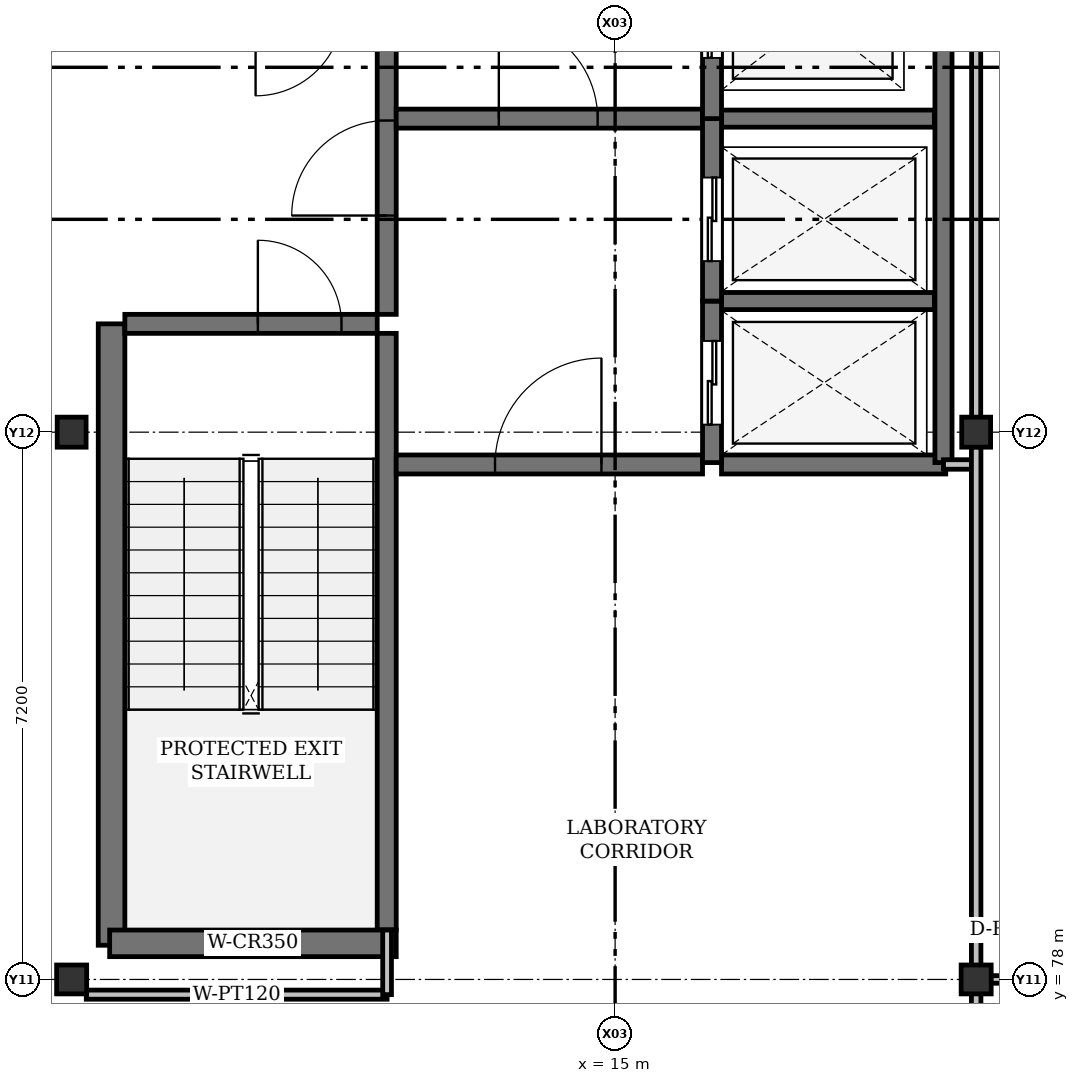
"""IFC4 building model, lengths in metres.
Left out: names, types, materials, properties, quantities, classifications, styles, units other than length and angle.
Written with IfcOpenShell. Run it as: python <this file> out.ifc"""

import sys

from ifc_helpers import new_model, si_unit, direction, frame, frame_2d, origin, origin_2d, place, context, subcontext, project, spatial, rectangle, i_section, extrude, element, fill, save


model = new_model("IFC4")
c1 = context("Model", 3, precision=1e-05, world=origin(), true_north=direction((0.0, 1.0)))
c2 = subcontext(c1, "Body", "Model", "MODEL_VIEW")
j1 = project(units=[si_unit("LENGTHUNIT", "METRE"), si_unit("PLANEANGLEUNIT", "RADIAN")], contexts=[c1])
p1 = place(None, origin())
s1 = spatial("IfcSite", under=j1, at=p1, CompositionType="ELEMENT")
p2 = place(p1, origin())
s2 = spatial("IfcBuilding", under=s1, at=p2, CompositionType="ELEMENT")
p3 = place(p2, frame((0.0, 0.0, 14.1)))
s3 = spatial("IfcBuildingStorey", under=s2, at=p3, CompositionType="ELEMENT", Elevation=14.1)
for number, where, z_axis, x_axis in (
    (1, (7.85, 78.0, 0.0), (0.0, 0.0, 1.0), (1.0, 0.0, 0.0)),
    (2, (19.75, 78.0, 0.0), (0.0, 0.0, 1.0), (1.0, 0.0, 0.0)),
    (3, (7.85, 85.2, 0.0), (0.0, 0.0, 1.0), (0.0, 1.0, 0.0)),
    (4, (19.75, 85.2, 0.0), (0.0, 0.0, 1.0), (0.0, 1.0, 0.0)),
):
    element("IfcColumn", number, at=place(p3, frame(where, z_axis=z_axis, x_axis=x_axis)), inside=s3, PredefinedType="COLUMN", context=c2, shape_type="SweptSolid", body=[
        extrude(i_section(OverallWidth=0.395, OverallDepth=0.38, WebThickness=0.019, FlangeThickness=0.03, FilletRadius=0.015, at=origin_2d()), origin(), (0.0, 0.0, 1.0), 4.2),
    ])
p4 = place(p3, frame((8.375, 78.45, 0.0), z_axis=(0.0, 0.0, 1.0), x_axis=(0.0, 1.0, 0.0)))
e5 = element("IfcWall", 5, at=p4, inside=s3, PredefinedType="SHEAR", context=c2, shape_type="SweptSolid", body=[
    extrude(rectangle(XDim=8.175, YDim=0.35, at=frame_2d((4.087, 0.0))), origin(), (0.0, 0.0, 1.0), 4.2),
])
p5 = place(p3, frame((11.995, 78.65, 0.0), z_axis=(0.0, 0.0, 1.0), x_axis=(0.0, 1.0, 0.0)))
e6 = element("IfcWall", 6, at=p5, inside=s3, PredefinedType="SHEAR", context=c2, shape_type="SweptSolid", body=[
    extrude(rectangle(XDim=7.85, YDim=0.25, at=frame_2d((3.925, 0.0))), origin(), (0.0, 0.0, 1.0), 4.2),
])
p6 = place(p3, frame((11.995, 86.75, 0.0), z_axis=(0.0, 0.0, 1.0), x_axis=(0.0, 1.0, 0.0)))
e7 = element("IfcWall", 7, at=p6, inside=s3, PredefinedType="SHEAR", context=c2, shape_type="SweptSolid", body=[
    extrude(rectangle(XDim=3.9, YDim=0.25, at=frame_2d((1.95, 0.0))), origin(), (0.0, 0.0, 1.0), 4.2),
])
p7 = place(p6, frame((1.3, 0.0, 0.0)))
e8 = element("IfcOpeningElement", 8, at=p7, cuts=e7, PredefinedType="OPENING", context=c2, shape_type="SweptSolid", body=[
    extrude(rectangle(XDim=1.25, YDim=2.2, at=frame_2d((0.625, 1.1))), frame((0.0, 0.125, 0.0), z_axis=(0.0, -1.0, 0.0), x_axis=(1.0, 0.0, 0.0)), (0.0, 0.0, 1.0), 0.25),
])
p8 = place(p3, frame((8.35, 78.475, 0.0), z_axis=(0.0, 0.0, 1.0), x_axis=(1.0, 0.0, 0.0)))
e9 = element("IfcWall", 9, at=p8, inside=s3, PredefinedType="SHEAR", context=c2, shape_type="SweptSolid", body=[
    extrude(rectangle(XDim=3.77, YDim=0.35, at=frame_2d((1.885, 0.0))), origin(), (0.0, 0.0, 1.0), 4.2),
])
p9 = place(p3, frame((8.55, 86.625, 0.0), z_axis=(0.0, 0.0, 1.0), x_axis=(1.0, 0.0, 0.0)))
e10 = element("IfcWall", 10, at=p9, inside=s3, PredefinedType="SHEAR", context=c2, shape_type="SweptSolid", body=[
    extrude(rectangle(XDim=3.32, YDim=0.25, at=frame_2d((1.66, 0.0))), origin(), (0.0, 0.0, 1.0), 4.2),
])
p10 = place(p9, frame((1.75, 0.0, 0.0)))
e11 = element("IfcOpeningElement", 11, at=p10, cuts=e10, PredefinedType="OPENING", context=c2, shape_type="SweptSolid", body=[
    extrude(rectangle(XDim=1.1, YDim=2.15, at=frame_2d((0.55, 1.075))), frame((0.0, 0.125, 0.0), z_axis=(0.0, -1.0, 0.0), x_axis=(1.0, 0.0, 0.0)), (0.0, 0.0, 1.0), 0.25),
])
p11 = place(p3, frame((12.12, 89.325, 0.0), z_axis=(0.0, 0.0, 1.0), x_axis=(1.0, 0.0, 0.0)))
e12 = element("IfcWall", 12, at=p11, inside=s3, PredefinedType="SHEAR", context=c2, shape_type="SweptSolid", body=[
    extrude(rectangle(XDim=4.03, YDim=0.25, at=frame_2d((2.015, 0.0))), origin(), (0.0, 0.0, 1.0), 4.2),
])
p12 = place(p11, frame((1.35, 0.0, 0.0)))
e13 = element("IfcOpeningElement", 13, at=p12, cuts=e12, PredefinedType="OPENING", context=c2, shape_type="SweptSolid", body=[
    extrude(rectangle(XDim=1.3, YDim=2.2, at=frame_2d((0.65, 1.1))), frame((0.0, 0.125, 0.0), z_axis=(0.0, -1.0, 0.0), x_axis=(1.0, 0.0, 0.0)), (0.0, 0.0, 1.0), 0.25),
])
p13 = place(p3, frame((12.12, 84.775, 0.0), z_axis=(0.0, 0.0, 1.0), x_axis=(1.0, 0.0, 0.0)))
e14 = element("IfcWall", 14, at=p13, inside=s3, PredefinedType="SHEAR", context=c2, shape_type="SweptSolid", body=[
    extrude(rectangle(XDim=4.03, YDim=0.25, at=frame_2d((2.015, 0.0))), origin(), (0.0, 0.0, 1.0), 4.2),
])
p14 = place(p13, frame((1.3, 0.0, 0.0)))
e15 = element("IfcOpeningElement", 15, at=p14, cuts=e14, PredefinedType="OPENING", context=c2, shape_type="SweptSolid", body=[
    extrude(rectangle(XDim=1.4, YDim=2.25, at=frame_2d((0.7, 1.125))), frame((0.0, 0.125, 0.0), z_axis=(0.0, -1.0, 0.0), x_axis=(1.0, 0.0, 0.0)), (0.0, 0.0, 1.0), 0.25),
])
p15 = place(p3, frame((16.4, 84.775, 0.0), z_axis=(0.0, 0.0, 1.0), x_axis=(1.0, 0.0, 0.0)))
e16 = element("IfcWall", 16, at=p15, inside=s3, PredefinedType="SHEAR", context=c2, shape_type="SweptSolid", body=[
    extrude(rectangle(XDim=2.95, YDim=0.25, at=frame_2d((1.475, 0.0))), origin(), (0.0, 0.0, 1.0), 4.2),
])
p16 = place(p3, frame((19.32, 84.8, 0.0), z_axis=(0.0, 0.0, 1.0), x_axis=(0.0, 1.0, 0.0)))
e17 = element("IfcWall", 17, at=p16, inside=s3, PredefinedType="SHEAR", context=c2, shape_type="SweptSolid", body=[
    extrude(rectangle(XDim=13.95, YDim=0.225, at=frame_2d((6.975, 0.0))), origin(), (0.0, 0.0, 1.0), 4.2),
])
for number, where, z_axis, x_axis in (
    (18, (16.4, 86.925, 0.0), (0.0, 0.0, 1.0), (1.0, 0.0, 0.0)),
    (19, (16.4, 89.325, 0.0), (0.0, 0.0, 1.0), (1.0, 0.0, 0.0)),
):
    element("IfcWall", number, at=place(p3, frame(where, z_axis=z_axis, x_axis=x_axis)), inside=s3, PredefinedType="SHEAR", context=c2, shape_type="SweptSolid", body=[
        extrude(rectangle(XDim=2.8, YDim=0.225, at=frame_2d((1.4, 0.0))), origin(), (0.0, 0.0, 1.0), 4.2),
    ])
p17 = place(p3, frame((16.275, 84.8, 0.0), z_axis=(0.0, 0.0, 1.0), x_axis=(0.0, 1.0, 0.0)))
e20 = element("IfcWall", 20, at=p17, inside=s3, PredefinedType="SHEAR", context=c2, shape_type="SweptSolid", body=[
    extrude(rectangle(XDim=2.125, YDim=0.25, at=frame_2d((1.062, 0.0))), origin(), (0.0, 0.0, 1.0), 4.2),
])
p18 = place(p17, frame((0.5, 0.0, 0.0)))
e21 = element("IfcOpeningElement", 21, at=p18, cuts=e20, PredefinedType="OPENING", context=c2, shape_type="SweptSolid", body=[
    extrude(rectangle(XDim=1.1, YDim=2.15, at=frame_2d((0.55, 1.075))), frame((0.0, 0.125, 0.0), z_axis=(0.0, -1.0, 0.0), x_axis=(1.0, 0.0, 0.0)), (0.0, 0.0, 1.0), 0.25),
])
p19 = place(p3, frame((16.275, 86.925, 0.0), z_axis=(0.0, 0.0, 1.0), x_axis=(0.0, 1.0, 0.0)))
e22 = element("IfcWall", 22, at=p19, inside=s3, PredefinedType="SHEAR", context=c2, shape_type="SweptSolid", body=[
    extrude(rectangle(XDim=2.4, YDim=0.25, at=frame_2d((1.2, 0.0))), origin(), (0.0, 0.0, 1.0), 4.2),
])
p20 = place(p19, frame((0.525, 0.0, 0.0)))
e23 = element("IfcOpeningElement", 23, at=p20, cuts=e22, PredefinedType="OPENING", context=c2, shape_type="SweptSolid", body=[
    extrude(rectangle(XDim=1.1, YDim=2.15, at=frame_2d((0.55, 1.075))), frame((0.0, 0.125, 0.0), z_axis=(0.0, -1.0, 0.0), x_axis=(1.0, 0.0, 0.0)), (0.0, 0.0, 1.0), 0.25),
])
p21 = place(p3, frame((16.275, 89.325, 0.0), z_axis=(0.0, 0.0, 1.0), x_axis=(0.0, 1.0, 0.0)))
e24 = element("IfcWall", 24, at=p21, inside=s3, PredefinedType="SHEAR", context=c2, shape_type="SweptSolid", body=[
    extrude(rectangle(XDim=2.4, YDim=0.25, at=frame_2d((1.2, 0.0))), origin(), (0.0, 0.0, 1.0), 4.2),
])
p22 = place(p21, frame((0.8, 0.0, 0.0)))
e25 = element("IfcOpeningElement", 25, at=p22, cuts=e24, PredefinedType="OPENING", context=c2, shape_type="SweptSolid", body=[
    extrude(rectangle(XDim=1.05, YDim=2.15, at=frame_2d((0.525, 1.075))), frame((0.0, 0.125, 0.0), z_axis=(0.0, -1.0, 0.0), x_axis=(1.0, 0.0, 0.0)), (0.0, 0.0, 1.0), 0.25),
])
p23 = place(p3, frame((19.32, 84.775, 0.0), z_axis=(0.0, 0.0, 1.0), x_axis=(1.0, 0.0, 0.0)))
e26 = element("IfcWall", 26, at=p23, inside=s3, PredefinedType="PARTITIONING", context=c2, shape_type="SweptSolid", body=[
    extrude(rectangle(XDim=0.43, YDim=0.125, at=frame_2d((0.215, 0.0))), origin(), (0.0, 0.0, 1.0), 3.527),
])
p24 = place(p3, frame((8.042, 77.8, 0.0), z_axis=(0.0, 0.0, 1.0), x_axis=(1.0, 0.0, 0.0)))
e27 = element("IfcWall", 27, at=p24, inside=s3, PredefinedType="PARTITIONING", context=c2, shape_type="SweptSolid", body=[
    extrude(rectangle(XDim=3.958, YDim=0.12, at=frame_2d((1.979, 0.0))), origin(), (0.0, 0.0, 1.0), 3.451),
])
p25 = place(p3, frame((12.0, 77.8, 0.0), z_axis=(0.0, 0.0, 1.0), x_axis=(0.0, 1.0, 0.0)))
e28 = element("IfcWall", 28, at=p25, inside=s3, PredefinedType="PARTITIONING", context=c2, shape_type="SweptSolid", body=[
    extrude(rectangle(XDim=0.85, YDim=0.115, at=frame_2d((0.425, 0.0))), origin(), (0.0, 0.0, 1.0), 3.451),
])
p26 = place(p3, frame((19.75, 78.185, 0.0), z_axis=(0.0, 0.0, 1.0), x_axis=(0.0, 1.0, 0.0)))
e29 = element("IfcWall", 29, at=p26, inside=s3, PredefinedType="PARTITIONING", context=c2, shape_type="SweptSolid", body=[
    extrude(rectangle(XDim=6.823, YDim=0.125, at=frame_2d((3.411, 0.0))), origin(), (0.0, 0.0, 1.0), 3.527),
])
p27 = place(p3, frame((19.75, 85.393, 0.0), z_axis=(0.0, 0.0, 1.0), x_axis=(0.0, 1.0, 0.0)))
e30 = element("IfcWall", 30, at=p27, inside=s3, PredefinedType="PARTITIONING", context=c2, shape_type="SweptSolid", body=[
    extrude(rectangle(XDim=6.823, YDim=0.12, at=frame_2d((3.411, 0.0))), origin(), (0.0, 0.0, 1.0), 3.527),
])
p28 = place(p3, frame((29.107, 78.0, 0.0), z_axis=(0.0, 0.0, 1.0), x_axis=(-1.0, 0.0, 0.0)))
e31 = element("IfcWall", 31, at=p28, inside=s3, PredefinedType="PARTITIONING", context=c2, shape_type="SweptSolid", body=[
    extrude(rectangle(XDim=9.165, YDim=0.1, at=frame_2d((4.583, 0.0))), origin(), (0.0, 0.0, 1.0), 3.451),
])
p29 = place(p3, frame((19.75, 70.692, 0.0), z_axis=(0.0, 0.0, 1.0), x_axis=(0.0, 1.0, 0.0)))
e32 = element("IfcWall", 32, at=p29, inside=s3, PredefinedType="PARTITIONING", context=c2, shape_type="SweptSolid", body=[
    extrude(rectangle(XDim=7.123, YDim=0.125, at=frame_2d((3.561, 0.0))), origin(), (0.0, 0.0, 1.0), 3.527),
])
p30 = place(p29, frame((5.532, 0.0, 0.0)))
e33 = element("IfcOpeningElement", 33, at=p30, cuts=e32, PredefinedType="OPENING", context=c2, shape_type="SweptSolid", body=[
    extrude(rectangle(XDim=1.05, YDim=2.1, at=frame_2d((0.525, 1.05))), frame((0.0, 0.062, 0.0), z_axis=(0.0, -1.0, 0.0), x_axis=(1.0, 0.0, 0.0)), (0.0, 0.0, 1.0), 0.125),
])
p31 = place(p7, origin())
e34 = element("IfcDoor", 34, at=p31, inside=s3, OperationType="SINGLE_SWING_LEFT", PredefinedType="DOOR", context=c2, shape_type="SweptSolid", body=[
    extrude(rectangle(XDim=1.25, YDim=2.2, at=frame_2d((0.625, 1.1))), frame((0.0, 0.025, 0.0), z_axis=(0.0, -1.0, 0.0), x_axis=(1.0, 0.0, 0.0)), (0.0, 0.0, 1.0), 0.05),
])
fill(e8, e34)
p32 = place(p10, origin())
e35 = element("IfcDoor", 35, at=p32, inside=s3, OperationType="SINGLE_SWING_LEFT", PredefinedType="DOOR", context=c2, shape_type="SweptSolid", body=[
    extrude(rectangle(XDim=1.1, YDim=2.15, at=frame_2d((0.55, 1.075))), frame((0.0, 0.025, 0.0), z_axis=(0.0, -1.0, 0.0), x_axis=(1.0, 0.0, 0.0)), (0.0, 0.0, 1.0), 0.05),
])
fill(e11, e35)
p33 = place(p12, origin())
e36 = element("IfcDoor", 36, at=p33, inside=s3, OperationType="SINGLE_SWING_LEFT", PredefinedType="DOOR", context=c2, shape_type="SweptSolid", body=[
    extrude(rectangle(XDim=1.3, YDim=2.2, at=frame_2d((0.65, 1.1))), frame((0.0, 0.025, 0.0), z_axis=(0.0, -1.0, 0.0), x_axis=(1.0, 0.0, 0.0)), (0.0, 0.0, 1.0), 0.05),
])
fill(e13, e36)
p34 = place(p14, origin())
e37 = element("IfcDoor", 37, at=p34, inside=s3, OperationType="SINGLE_SWING_RIGHT", PredefinedType="DOOR", context=c2, shape_type="SweptSolid", body=[
    extrude(rectangle(XDim=1.4, YDim=2.25, at=frame_2d((0.7, 1.125))), frame((0.0, 0.025, 0.0), z_axis=(0.0, -1.0, 0.0), x_axis=(1.0, 0.0, 0.0)), (0.0, 0.0, 1.0), 0.05),
])
fill(e15, e37)
p35 = place(p18, origin())
e38 = element("IfcDoor", 38, at=p35, inside=s3, OperationType="SLIDING_TO_LEFT", PredefinedType="DOOR", context=c2, shape_type="SweptSolid", body=[
    extrude(rectangle(XDim=1.1, YDim=2.15, at=frame_2d((0.55, 1.075))), frame((0.0, 0.025, 0.0), z_axis=(0.0, -1.0, 0.0), x_axis=(1.0, 0.0, 0.0)), (0.0, 0.0, 1.0), 0.05),
])
fill(e21, e38)
p36 = place(p20, origin())
e39 = element("IfcDoor", 39, at=p36, inside=s3, OperationType="SLIDING_TO_LEFT", PredefinedType="DOOR", context=c2, shape_type="SweptSolid", body=[
    extrude(rectangle(XDim=1.1, YDim=2.15, at=frame_2d((0.55, 1.075))), frame((0.0, 0.025, 0.0), z_axis=(0.0, -1.0, 0.0), x_axis=(1.0, 0.0, 0.0)), (0.0, 0.0, 1.0), 0.05),
])
fill(e23, e39)
p37 = place(p22, origin())
e40 = element("IfcDoor", 40, at=p37, inside=s3, OperationType="SLIDING_TO_LEFT", PredefinedType="DOOR", context=c2, shape_type="SweptSolid", body=[
    extrude(rectangle(XDim=1.05, YDim=2.15, at=frame_2d((0.525, 1.075))), frame((0.0, 0.025, 0.0), z_axis=(0.0, -1.0, 0.0), x_axis=(1.0, 0.0, 0.0)), (0.0, 0.0, 1.0), 0.05),
])
fill(e25, e40)
save(model, sys.argv[1])
